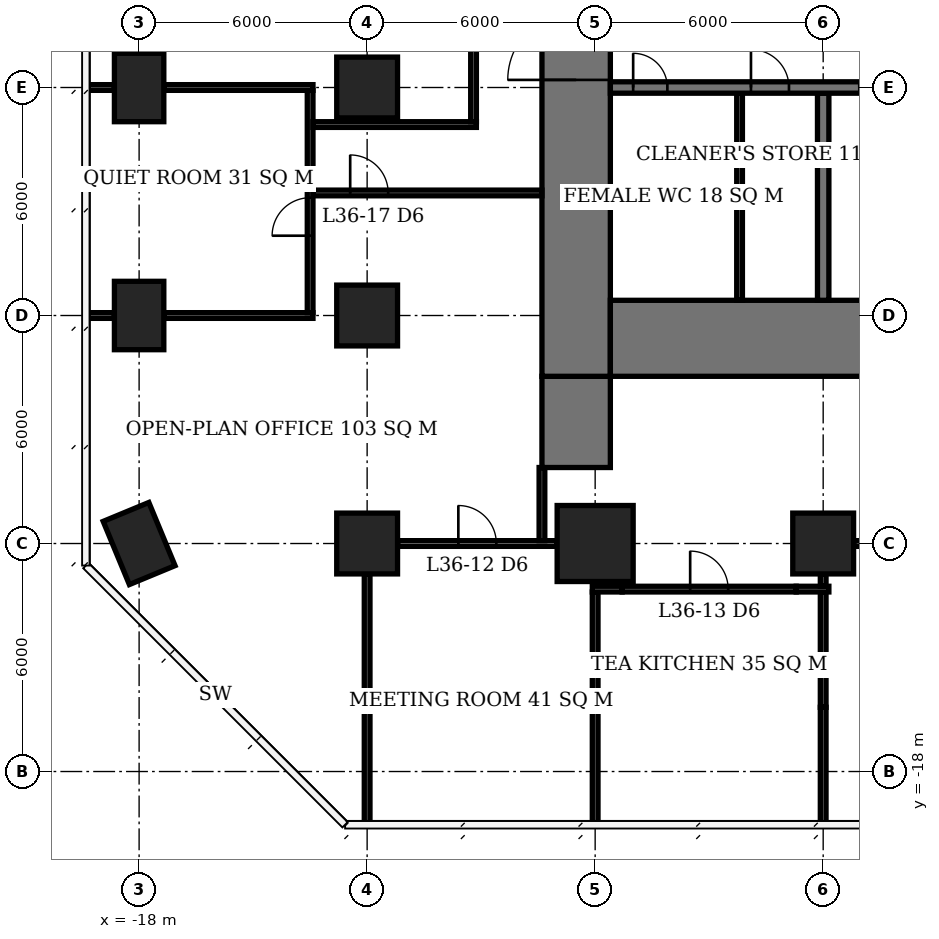
"""IFC4 building model, lengths in metres.
Left out: names, types, materials, properties, quantities, classifications, styles, units other than length and angle.
Written with IfcOpenShell. Run it as: python <this file> out.ifc"""

import sys

from ifc_helpers import new_model, si_unit, direction, frame, frame_2d, origin, origin_2d, place, context, subcontext, project, spatial, rectangle, extrude, element, fill, save


model = new_model("IFC4")
c1 = context("Model", 3, precision=1e-05, world=origin(), true_north=direction((0.0, 1.0)))
c2 = subcontext(c1, "Body", "Model", "MODEL_VIEW")
j1 = project(units=[si_unit("LENGTHUNIT", "METRE"), si_unit("PLANEANGLEUNIT", "RADIAN")], contexts=[c1])
p1 = place(None, origin())
s1 = spatial("IfcSite", under=j1, at=p1, CompositionType="ELEMENT")
p2 = place(p1, origin())
s2 = spatial("IfcBuilding", under=s1, at=p2, CompositionType="ELEMENT")
p3 = place(p2, frame((0.0, 0.0, 148.4)))
s3 = spatial("IfcBuildingStorey", under=s2, at=p3, CompositionType="ELEMENT", Elevation=148.4)
for number, where, z_axis, x_axis in (
    (1, (-18.0, -12.0, 0.0), (0.0, 0.0, 1.0), (-0.383, 0.924, 0.0)),
    (2, (-18.0, -6.0, 0.0), (0.0, 0.0, 1.0), (0.0, 1.0, 0.0)),
    (3, (-18.0, 0.0, 0.0), (0.0, 0.0, 1.0), (0.0, 1.0, 0.0)),
):
    element("IfcColumn", number, at=place(p3, frame(where, z_axis=z_axis, x_axis=x_axis)), inside=s3, PredefinedType="COLUMN", context=c2, shape_type="SweptSolid", body=[
        extrude(rectangle(XDim=1.8, YDim=1.3, at=origin_2d()), origin(), (0.0, 0.0, 1.0), 3.9),
    ])
for number, where, z_axis, x_axis in (
    (4, (-12.0, -12.0, 0.0), (0.0, 0.0, 1.0), (1.0, 0.0, 0.0)),
    (5, (-12.0, -6.0, 0.0), (0.0, 0.0, 1.0), (1.0, 0.0, 0.0)),
    (6, (-12.0, 0.0, 0.0), (0.0, 0.0, 1.0), (1.0, 0.0, 0.0)),
):
    element("IfcColumn", number, at=place(p3, frame(where, z_axis=z_axis, x_axis=x_axis)), inside=s3, PredefinedType="COLUMN", context=c2, shape_type="SweptSolid", body=[
        extrude(rectangle(XDim=1.6, YDim=1.6, at=origin_2d()), origin(), (0.0, 0.0, 1.0), 3.9),
    ])
p4 = place(p3, frame((-6.0, -12.0, 0.0), z_axis=(0.0, 0.0, 1.0), x_axis=(1.0, 0.0, 0.0)))
e7 = element("IfcColumn", 7, at=p4, inside=s3, PredefinedType="COLUMN", context=c2, shape_type="SweptSolid", body=[
    extrude(rectangle(XDim=2.0, YDim=2.0, at=origin_2d()), origin(), (0.0, 0.0, 1.0), 3.9),
])
p5 = place(p3, frame((0.0, -12.0, 0.0), z_axis=(0.0, 0.0, 1.0), x_axis=(1.0, 0.0, 0.0)))
e8 = element("IfcColumn", 8, at=p5, inside=s3, PredefinedType="COLUMN", context=c2, shape_type="SweptSolid", body=[
    extrude(rectangle(XDim=1.6, YDim=1.6, at=origin_2d()), origin(), (0.0, 0.0, 1.0), 3.9),
])
p6 = place(p3, frame((-5.6, -6.6, 0.0), z_axis=(0.0, 0.0, 1.0), x_axis=(1.0, 0.0, 0.0)))
e9 = element("IfcWall", 9, at=p6, inside=s3, PredefinedType="SHEAR", context=c2, shape_type="SweptSolid", body=[
    extrude(rectangle(XDim=23.2, YDim=2.0, at=frame_2d((11.6, 0.0))), origin(), (0.0, 0.0, 1.0), 3.9),
])
p7 = place(p3, frame((-6.5, -7.6, 0.0), z_axis=(0.0, 0.0, 1.0), x_axis=(0.0, 1.0, 0.0)))
e10 = element("IfcWall", 10, at=p7, inside=s3, PredefinedType="SHEAR", context=c2, shape_type="SweptSolid", body=[
    extrude(rectangle(XDim=21.2, YDim=1.8, at=frame_2d((10.6, 0.0))), origin(), (0.0, 0.0, 1.0), 3.9),
])
p8 = place(p7, frame((7.8, 0.0, 0.0)))
e11 = element("IfcOpeningElement", 11, at=p8, cuts=e10, PredefinedType="OPENING", context=c2, shape_type="SweptSolid", body=[
    extrude(rectangle(XDim=1.8, YDim=2.4, at=frame_2d((0.9, 1.2))), frame((0.0, 0.91, 0.0), z_axis=(0.0, -1.0, 0.0), x_axis=(1.0, 0.0, 0.0)), (0.0, 0.0, 1.0), 1.82),
])
p9 = place(p3, frame((-6.5, -10.0, 0.0), z_axis=(0.0, 0.0, 1.0), x_axis=(0.0, 1.0, 0.0)))
e12 = element("IfcWall", 12, at=p9, inside=s3, PredefinedType="SHEAR", context=c2, shape_type="SweptSolid", body=[
    extrude(rectangle(XDim=2.4, YDim=1.8, at=frame_2d((1.2, 0.0))), origin(), (0.0, 0.0, 1.0), 3.9),
])
p10 = place(p3, frame((-5.6, 0.0, 0.0), z_axis=(0.0, 0.0, 1.0), x_axis=(1.0, 0.0, 0.0)))
e13 = element("IfcWall", 13, at=p10, inside=s3, PredefinedType="SHEAR", context=c2, shape_type="SweptSolid", body=[
    extrude(rectangle(XDim=17.75, YDim=0.3, at=frame_2d((8.875, 0.0))), origin(), (0.0, 0.0, 1.0), 3.9),
])
p11 = place(p10, frame((0.6, 0.0, 0.0)))
e14 = element("IfcOpeningElement", 14, at=p11, cuts=e13, PredefinedType="OPENING", context=c2, shape_type="SweptSolid", body=[
    extrude(rectangle(XDim=0.9, YDim=2.1, at=frame_2d((0.45, 1.05))), frame((0.0, 0.16, 0.0), z_axis=(0.0, -1.0, 0.0), x_axis=(1.0, 0.0, 0.0)), (0.0, 0.0, 1.0), 0.32),
])
p12 = place(p10, frame((3.7, 0.0, 0.0)))
e15 = element("IfcOpeningElement", 15, at=p12, cuts=e13, PredefinedType="OPENING", context=c2, shape_type="SweptSolid", body=[
    extrude(rectangle(XDim=1.0, YDim=2.1, at=frame_2d((0.5, 1.05))), frame((0.0, 0.16, 0.0), z_axis=(0.0, -1.0, 0.0), x_axis=(1.0, 0.0, 0.0)), (0.0, 0.0, 1.0), 0.32),
])
p13 = place(p10, frame((6.55, 0.0, 0.0)))
e16 = element("IfcOpeningElement", 16, at=p13, cuts=e13, PredefinedType="OPENING", context=c2, shape_type="SweptSolid", body=[
    extrude(rectangle(XDim=1.1, YDim=2.1, at=frame_2d((0.55, 1.05))), frame((0.0, 0.16, 0.0), z_axis=(0.0, -1.0, 0.0), x_axis=(1.0, 0.0, 0.0)), (0.0, 0.0, 1.0), 0.32),
])
p14 = place(p10, frame((9.55, 0.0, 0.0)))
e17 = element("IfcOpeningElement", 17, at=p14, cuts=e13, PredefinedType="OPENING", context=c2, shape_type="SweptSolid", body=[
    extrude(rectangle(XDim=1.1, YDim=2.1, at=frame_2d((0.55, 1.05))), frame((0.0, 0.16, 0.0), z_axis=(0.0, -1.0, 0.0), x_axis=(1.0, 0.0, 0.0)), (0.0, 0.0, 1.0), 0.32),
])
p15 = place(p3, frame((0.0, -5.6, 0.0), z_axis=(0.0, 0.0, 1.0), x_axis=(0.0, 1.0, 0.0)))
e18 = element("IfcWall", 18, at=p15, inside=s3, PredefinedType="SHEAR", context=c2, shape_type="SweptSolid", body=[
    extrude(rectangle(XDim=5.45, YDim=0.3, at=frame_2d((2.725, 0.0))), origin(), (0.0, 0.0, 1.0), 3.9),
])
p16 = place(p3, frame((-2.2, -5.6, 0.0), z_axis=(0.0, 0.0, 1.0), x_axis=(0.0, 1.0, 0.0)))
e19 = element("IfcWall", 19, at=p16, inside=s3, PredefinedType="PLUMBINGWALL", context=c2, shape_type="SweptSolid", body=[
    extrude(rectangle(XDim=5.45, YDim=0.15, at=frame_2d((2.725, 0.0))), origin(), (0.0, 0.0, 1.0), 3.65),
])
p17 = place(p3, frame((-6.075, -13.2, 0.0), z_axis=(0.0, 0.0, 1.0), x_axis=(1.0, 0.0, 0.0)))
e20 = element("IfcWall", 20, at=p17, inside=s3, PredefinedType="PARTITIONING", context=c2, shape_type="SweptSolid", body=[
    extrude(rectangle(XDim=0.785, YDim=0.15, at=frame_2d((0.393, 0.0))), origin(), (0.0, 0.0, 1.0), 2.65),
])
p18 = place(p3, frame((-5.29, -13.2, 0.0), z_axis=(0.0, 0.0, 1.0), x_axis=(1.0, 0.0, 0.0)))
e21 = element("IfcWall", 21, at=p18, inside=s3, PredefinedType="PARTITIONING", context=c2, shape_type="SweptSolid", body=[
    extrude(rectangle(XDim=4.58, YDim=0.15, at=frame_2d((2.29, 0.0))), origin(), (0.0, 0.0, 1.0), 3.65),
])
p19 = place(p18, frame((1.79, 0.0, 0.0)))
e22 = element("IfcOpeningElement", 22, at=p19, cuts=e21, PredefinedType="OPENING", context=c2, shape_type="SweptSolid", body=[
    extrude(rectangle(XDim=1.0, YDim=2.1, at=frame_2d((0.5, 1.05))), frame((0.0, 0.085, 0.0), z_axis=(0.0, -1.0, 0.0), x_axis=(1.0, 0.0, 0.0)), (0.0, 0.0, 1.0), 0.17),
])
p20 = place(p3, frame((-0.71, -13.2, 0.0), z_axis=(0.0, 0.0, 1.0), x_axis=(1.0, 0.0, 0.0)))
e23 = element("IfcWall", 23, at=p20, inside=s3, PredefinedType="PARTITIONING", context=c2, shape_type="SweptSolid", body=[
    extrude(rectangle(XDim=0.86, YDim=0.15, at=frame_2d((0.43, 0.0))), origin(), (0.0, 0.0, 1.0), 2.65),
])
p21 = place(p3, frame((-11.2, -12.0, 0.0), z_axis=(0.0, 0.0, 1.0), x_axis=(1.0, 0.0, 0.0)))
e24 = element("IfcWall", 24, at=p21, inside=s3, PredefinedType="PARTITIONING", context=c2, shape_type="SweptSolid", body=[
    extrude(rectangle(XDim=4.2, YDim=0.15, at=frame_2d((2.1, 0.0))), origin(), (0.0, 0.0, 1.0), 3.65),
])
p22 = place(p21, frame((1.6, 0.0, 0.0)))
e25 = element("IfcOpeningElement", 25, at=p22, cuts=e24, PredefinedType="OPENING", context=c2, shape_type="SweptSolid", body=[
    extrude(rectangle(XDim=1.0, YDim=2.1, at=frame_2d((0.5, 1.05))), frame((0.0, 0.085, 0.0), z_axis=(0.0, -1.0, 0.0), x_axis=(1.0, 0.0, 0.0)), (0.0, 0.0, 1.0), 0.17),
])
p23 = place(p3, frame((0.8, -12.0, 0.0), z_axis=(0.0, 0.0, 1.0), x_axis=(1.0, 0.0, 0.0)))
e26 = element("IfcWall", 26, at=p23, inside=s3, PredefinedType="PARTITIONING", context=c2, shape_type="SweptSolid", body=[
    extrude(rectangle(XDim=4.4, YDim=0.15, at=frame_2d((2.2, 0.0))), origin(), (0.0, 0.0, 1.0), 3.65),
])
p24 = place(p23, frame((1.7, 0.0, 0.0)))
e27 = element("IfcOpeningElement", 27, at=p24, cuts=e26, PredefinedType="OPENING", context=c2, shape_type="SweptSolid", body=[
    extrude(rectangle(XDim=1.0, YDim=2.1, at=frame_2d((0.5, 1.05))), frame((0.0, 0.085, 0.0), z_axis=(0.0, -1.0, 0.0), x_axis=(1.0, 0.0, 0.0)), (0.0, 0.0, 1.0), 0.17),
])
p25 = place(p3, frame((-19.4, -6.0, 0.0), z_axis=(0.0, 0.0, 1.0), x_axis=(1.0, 0.0, 0.0)))
e28 = element("IfcWall", 28, at=p25, inside=s3, PredefinedType="PARTITIONING", context=c2, shape_type="SweptSolid", body=[
    extrude(rectangle(XDim=0.75, YDim=0.15, at=frame_2d((0.375, 0.0))), origin(), (0.0, 0.0, 1.0), 3.65),
])
p26 = place(p3, frame((-17.35, -6.0, 0.0), z_axis=(0.0, 0.0, 1.0), x_axis=(1.0, 0.0, 0.0)))
e29 = element("IfcWall", 29, at=p26, inside=s3, PredefinedType="PARTITIONING", context=c2, shape_type="SweptSolid", body=[
    extrude(rectangle(XDim=3.925, YDim=0.15, at=frame_2d((1.962, 0.0))), origin(), (0.0, 0.0, 1.0), 3.65),
])
p27 = place(p3, frame((-19.35, 0.0, 0.0), z_axis=(0.0, 0.0, 1.0), x_axis=(1.0, 0.0, 0.0)))
e30 = element("IfcWall", 30, at=p27, inside=s3, PredefinedType="PARTITIONING", context=c2, shape_type="SweptSolid", body=[
    extrude(rectangle(XDim=0.7, YDim=0.15, at=frame_2d((0.35, 0.0))), origin(), (0.0, 0.0, 1.0), 3.65),
])
p28 = place(p3, frame((-17.35, 0.0, 0.0), z_axis=(0.0, 0.0, 1.0), x_axis=(1.0, 0.0, 0.0)))
e31 = element("IfcWall", 31, at=p28, inside=s3, PredefinedType="PARTITIONING", context=c2, shape_type="SweptSolid", body=[
    extrude(rectangle(XDim=3.925, YDim=0.15, at=frame_2d((1.962, 0.0))), origin(), (0.0, 0.0, 1.0), 3.65),
])
p29 = place(p3, frame((-13.5, -5.925, 0.0), z_axis=(0.0, 0.0, 1.0), x_axis=(0.0, 1.0, 0.0)))
e32 = element("IfcWall", 32, at=p29, inside=s3, PredefinedType="PARTITIONING", context=c2, shape_type="SweptSolid", body=[
    extrude(rectangle(XDim=5.85, YDim=0.15, at=frame_2d((2.925, 0.0))), origin(), (0.0, 0.0, 1.0), 3.65),
])
p30 = place(p29, frame((2.025, 0.0, 0.0)))
e33 = element("IfcOpeningElement", 33, at=p30, cuts=e32, PredefinedType="OPENING", context=c2, shape_type="SweptSolid", body=[
    extrude(rectangle(XDim=1.0, YDim=2.1, at=frame_2d((0.5, 1.05))), frame((0.0, 0.085, 0.0), z_axis=(0.0, -1.0, 0.0), x_axis=(1.0, 0.0, 0.0)), (0.0, 0.0, 1.0), 0.17),
])
p31 = place(p3, frame((-12.0, -19.4, 0.0), z_axis=(0.0, 0.0, 1.0), x_axis=(0.0, 1.0, 0.0)))
e34 = element("IfcWall", 34, at=p31, inside=s3, PredefinedType="PARTITIONING", context=c2, shape_type="SweptSolid", body=[
    extrude(rectangle(XDim=3.09, YDim=0.15, at=frame_2d((1.545, 0.0))), origin(), (0.0, 0.0, 1.0), 3.65),
])
p32 = place(p3, frame((-12.0, -16.31, 0.0), z_axis=(0.0, 0.0, 1.0), x_axis=(0.0, 1.0, 0.0)))
e35 = element("IfcWall", 35, at=p32, inside=s3, PredefinedType="PARTITIONING", context=c2, shape_type="SweptSolid", body=[
    extrude(rectangle(XDim=3.51, YDim=0.15, at=frame_2d((1.755, 0.0))), origin(), (0.0, 0.0, 1.0), 2.65),
])
p33 = place(p3, frame((-6.0, -19.4, 0.0), z_axis=(0.0, 0.0, 1.0), x_axis=(0.0, 1.0, 0.0)))
e36 = element("IfcWall", 36, at=p33, inside=s3, PredefinedType="PARTITIONING", context=c2, shape_type="SweptSolid", body=[
    extrude(rectangle(XDim=3.09, YDim=0.15, at=frame_2d((1.545, 0.0))), origin(), (0.0, 0.0, 1.0), 3.65),
])
p34 = place(p3, frame((-6.0, -16.31, 0.0), z_axis=(0.0, 0.0, 1.0), x_axis=(0.0, 1.0, 0.0)))
e37 = element("IfcWall", 37, at=p34, inside=s3, PredefinedType="PARTITIONING", context=c2, shape_type="SweptSolid", body=[
    extrude(rectangle(XDim=3.035, YDim=0.15, at=frame_2d((1.518, 0.0))), origin(), (0.0, 0.0, 1.0), 2.65),
])
p35 = place(p3, frame((0.0, -19.4, 0.0), z_axis=(0.0, 0.0, 1.0), x_axis=(0.0, 1.0, 0.0)))
e38 = element("IfcWall", 38, at=p35, inside=s3, PredefinedType="PARTITIONING", context=c2, shape_type="SweptSolid", body=[
    extrude(rectangle(XDim=3.09, YDim=0.15, at=frame_2d((1.545, 0.0))), origin(), (0.0, 0.0, 1.0), 3.65),
])
p36 = place(p3, frame((0.0, -16.31, 0.0), z_axis=(0.0, 0.0, 1.0), x_axis=(0.0, 1.0, 0.0)))
e39 = element("IfcWall", 39, at=p36, inside=s3, PredefinedType="PARTITIONING", context=c2, shape_type="SweptSolid", body=[
    extrude(rectangle(XDim=3.035, YDim=0.15, at=frame_2d((1.518, 0.0))), origin(), (0.0, 0.0, 1.0), 2.65),
])
p37 = place(p3, frame((0.0, -13.125, 0.0), z_axis=(0.0, 0.0, 1.0), x_axis=(0.0, 1.0, 0.0)))
e40 = element("IfcWall", 40, at=p37, inside=s3, PredefinedType="PARTITIONING", context=c2, shape_type="SweptSolid", body=[
    extrude(rectangle(XDim=0.325, YDim=0.15, at=frame_2d((0.163, 0.0))), origin(), (0.0, 0.0, 1.0), 2.65),
])
p38 = place(p3, frame((-13.425, -2.775, 0.0), z_axis=(0.0, 0.0, 1.0), x_axis=(1.0, 0.0, 0.0)))
e41 = element("IfcWall", 41, at=p38, inside=s3, PredefinedType="PARTITIONING", context=c2, shape_type="SweptSolid", body=[
    extrude(rectangle(XDim=6.025, YDim=0.15, at=frame_2d((3.013, 0.0))), origin(), (0.0, 0.0, 1.0), 3.65),
])
p39 = place(p38, frame((0.979, 0.0, 0.0)))
e42 = element("IfcOpeningElement", 42, at=p39, cuts=e41, PredefinedType="OPENING", context=c2, shape_type="SweptSolid", body=[
    extrude(rectangle(XDim=1.0, YDim=2.1, at=frame_2d((0.5, 1.05))), frame((0.0, 0.085, 0.0), z_axis=(0.0, -1.0, 0.0), x_axis=(1.0, 0.0, 0.0)), (0.0, 0.0, 1.0), 0.17),
])
p40 = place(p3, frame((-13.425, -0.975, 0.0), z_axis=(0.0, 0.0, 1.0), x_axis=(1.0, 0.0, 0.0)))
e43 = element("IfcWall", 43, at=p40, inside=s3, PredefinedType="PARTITIONING", context=c2, shape_type="SweptSolid", body=[
    extrude(rectangle(XDim=4.3, YDim=0.15, at=frame_2d((2.15, 0.0))), origin(), (0.0, 0.0, 1.0), 3.65),
])
p41 = place(p3, frame((-9.2, -0.9, 0.0), z_axis=(0.0, 0.0, 1.0), x_axis=(0.0, 1.0, 0.0)))
e44 = element("IfcWall", 44, at=p41, inside=s3, PredefinedType="PARTITIONING", context=c2, shape_type="SweptSolid", body=[
    extrude(rectangle(XDim=26.3, YDim=0.15, at=frame_2d((13.15, 0.0))), origin(), (0.0, 0.0, 1.0), 3.65),
])
p42 = place(p41, frame((8.621, 0.0, 0.0)))
e45 = element("IfcOpeningElement", 45, at=p42, cuts=e44, PredefinedType="OPENING", context=c2, shape_type="SweptSolid", body=[
    extrude(rectangle(XDim=1.0, YDim=2.1, at=frame_2d((0.5, 1.05))), frame((0.0, 0.085, 0.0), z_axis=(0.0, -1.0, 0.0), x_axis=(1.0, 0.0, 0.0)), (0.0, 0.0, 1.0), 0.17),
])
p43 = place(p3, frame((-7.4, -11.925, 0.0), z_axis=(0.0, 0.0, 1.0), x_axis=(0.0, 1.0, 0.0)))
e46 = element("IfcWall", 46, at=p43, inside=s3, PredefinedType="PARTITIONING", context=c2, shape_type="SweptSolid", body=[
    extrude(rectangle(XDim=1.925, YDim=0.15, at=frame_2d((0.962, 0.0))), origin(), (0.0, 0.0, 1.0), 3.65),
])
p44 = place(p8, origin())
e47 = element("IfcDoor", 47, at=p44, inside=s3, OperationType="DOUBLE_DOOR_SINGLE_SWING", PredefinedType="DOOR", context=c2, shape_type="SweptSolid", body=[
    extrude(rectangle(XDim=1.8, YDim=2.4, at=frame_2d((0.9, 1.2))), frame((0.0, 0.025, 0.0), z_axis=(0.0, -1.0, 0.0), x_axis=(1.0, 0.0, 0.0)), (0.0, 0.0, 1.0), 0.05),
])
fill(e11, e47)
p45 = place(p11, origin())
e48 = element("IfcDoor", 48, at=p45, inside=s3, OperationType="SINGLE_SWING_LEFT", PredefinedType="DOOR", context=c2, shape_type="SweptSolid", body=[
    extrude(rectangle(XDim=0.9, YDim=2.1, at=frame_2d((0.45, 1.05))), frame((0.0, 0.025, 0.0), z_axis=(0.0, -1.0, 0.0), x_axis=(1.0, 0.0, 0.0)), (0.0, 0.0, 1.0), 0.05),
])
fill(e14, e48)
p46 = place(p12, origin())
e49 = element("IfcDoor", 49, at=p46, inside=s3, OperationType="SINGLE_SWING_LEFT", PredefinedType="DOOR", context=c2, shape_type="SweptSolid", body=[
    extrude(rectangle(XDim=1.0, YDim=2.1, at=frame_2d((0.5, 1.05))), frame((0.0, 0.025, 0.0), z_axis=(0.0, -1.0, 0.0), x_axis=(1.0, 0.0, 0.0)), (0.0, 0.0, 1.0), 0.05),
])
fill(e15, e49)
p47 = place(p22, origin())
e50 = element("IfcDoor", 50, at=p47, inside=s3, OperationType="SINGLE_SWING_LEFT", PredefinedType="DOOR", context=c2, shape_type="SweptSolid", body=[
    extrude(rectangle(XDim=1.0, YDim=2.1, at=frame_2d((0.5, 1.05))), frame((0.0, 0.025, 0.0), z_axis=(0.0, -1.0, 0.0), x_axis=(1.0, 0.0, 0.0)), (0.0, 0.0, 1.0), 0.05),
])
fill(e25, e50)
p48 = place(p19, origin())
e51 = element("IfcDoor", 51, at=p48, inside=s3, OperationType="SINGLE_SWING_LEFT", PredefinedType="DOOR", context=c2, shape_type="SweptSolid", body=[
    extrude(rectangle(XDim=1.0, YDim=2.1, at=frame_2d((0.5, 1.05))), frame((0.0, 0.025, 0.0), z_axis=(0.0, -1.0, 0.0), x_axis=(1.0, 0.0, 0.0)), (0.0, 0.0, 1.0), 0.05),
])
fill(e22, e51)
p49 = place(p30, origin())
e52 = element("IfcDoor", 52, at=p49, inside=s3, OperationType="SINGLE_SWING_LEFT", PredefinedType="DOOR", context=c2, shape_type="SweptSolid", body=[
    extrude(rectangle(XDim=1.0, YDim=2.1, at=frame_2d((0.5, 1.05))), frame((0.0, 0.025, 0.0), z_axis=(0.0, -1.0, 0.0), x_axis=(1.0, 0.0, 0.0)), (0.0, 0.0, 1.0), 0.05),
])
fill(e33, e52)
p50 = place(p39, origin())
e53 = element("IfcDoor", 53, at=p50, inside=s3, OperationType="SINGLE_SWING_LEFT", PredefinedType="DOOR", context=c2, shape_type="SweptSolid", body=[
    extrude(rectangle(XDim=1.0, YDim=2.1, at=frame_2d((0.5, 1.05))), frame((0.0, 0.025, 0.0), z_axis=(0.0, -1.0, 0.0), x_axis=(1.0, 0.0, 0.0)), (0.0, 0.0, 1.0), 0.05),
])
fill(e42, e53)
save(model, sys.argv[1])
